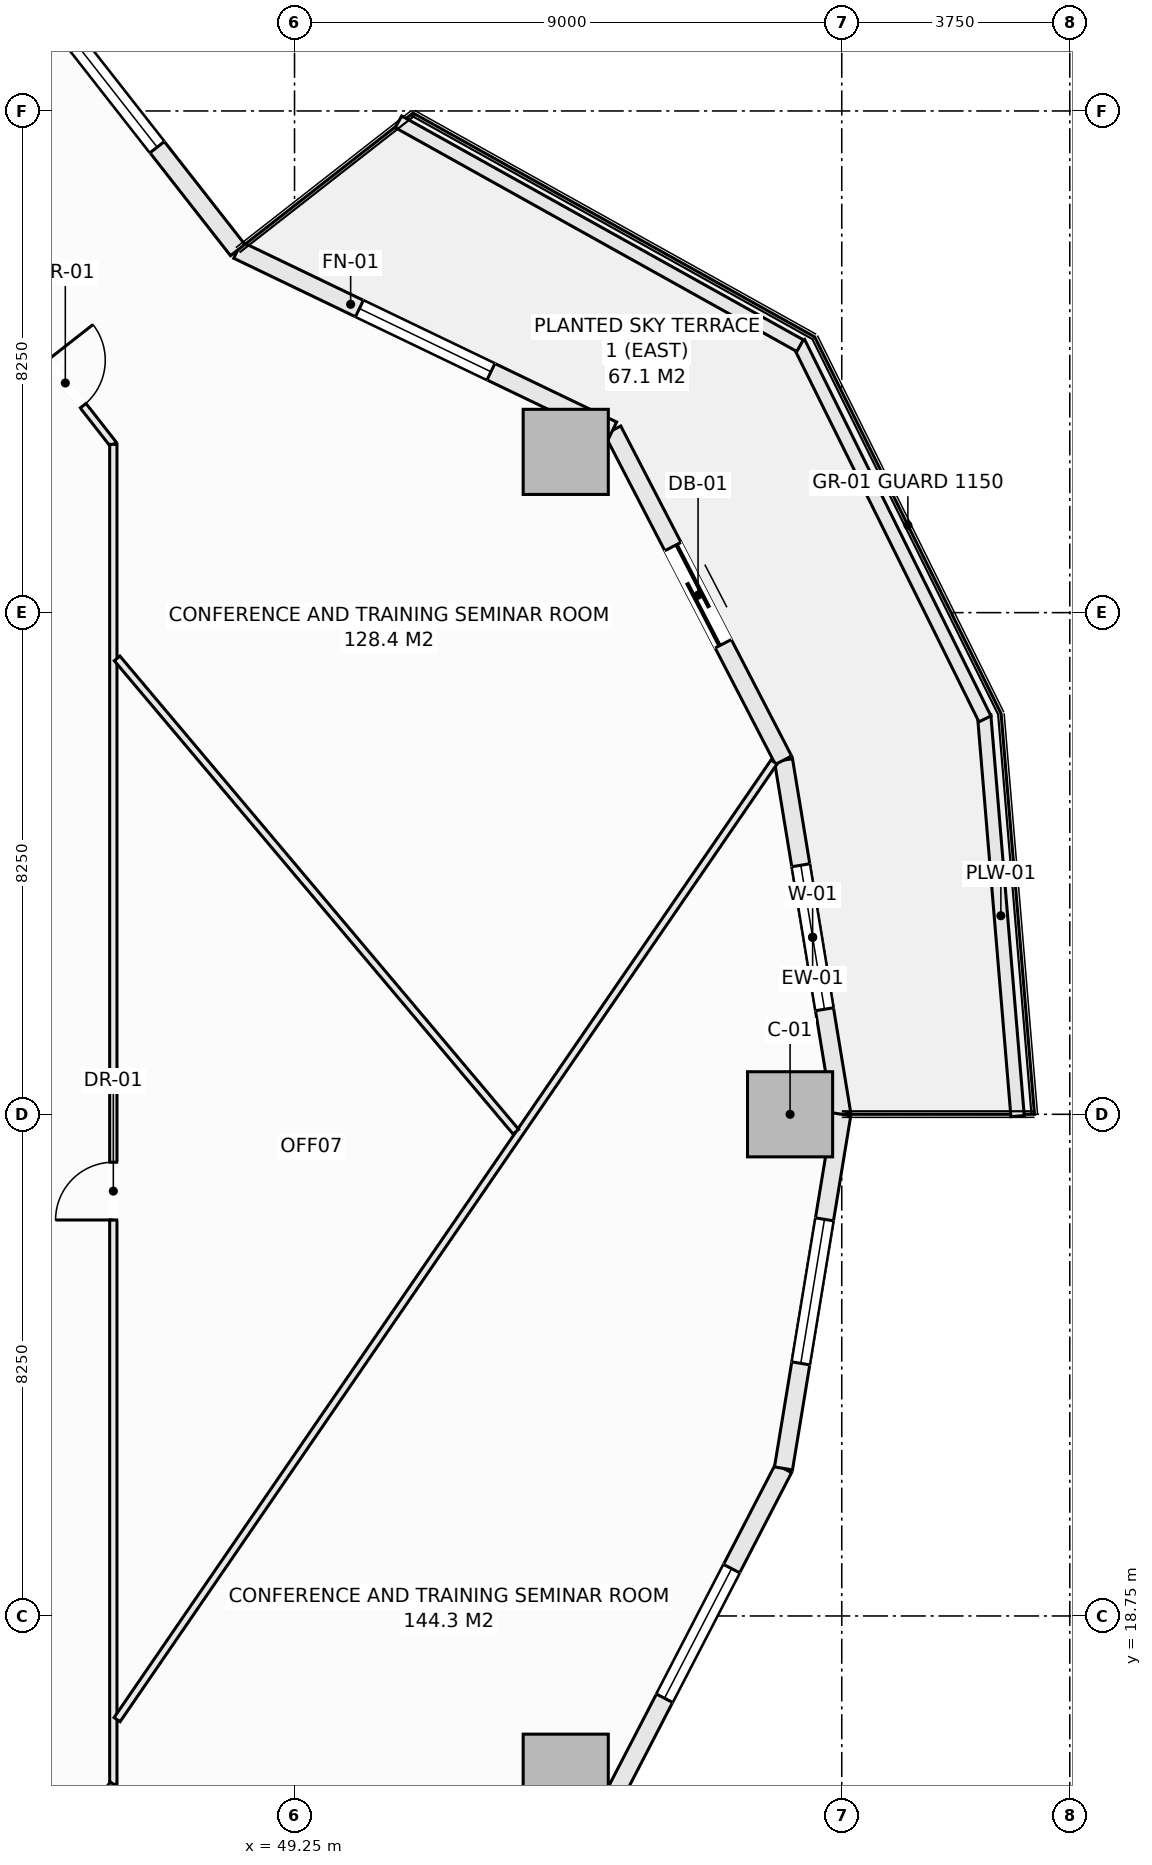
"""IFC4 building model, lengths in metres.
Left out: names, types, materials, properties, quantities, classifications, styles, units other than length and angle.
Written with IfcOpenShell. Run it as: python <this file> out.ifc"""

import sys

from ifc_helpers import new_model, si_unit, direction, frame, frame_2d, origin, origin_2d, place, context, subcontext, project, spatial, rectangle, extrude, element, fill, save


model = new_model("IFC4")
c1 = context("Model", 3, precision=1e-05, world=origin(), true_north=direction((0.0, 1.0)))
c2 = subcontext(c1, "Body", "Model", "MODEL_VIEW")
j1 = project(units=[si_unit("LENGTHUNIT", "METRE"), si_unit("PLANEANGLEUNIT", "RADIAN")], contexts=[c1])
p1 = place(None, origin())
s1 = spatial("IfcSite", under=j1, at=p1, CompositionType="ELEMENT")
p2 = place(p1, origin())
s2 = spatial("IfcBuilding", under=s1, at=p2, CompositionType="ELEMENT")
p3 = place(p2, frame((0.0, 0.0, 34.2)))
s3 = spatial("IfcBuildingStorey", under=s2, at=p3, CompositionType="ELEMENT", Elevation=34.2)
for number, where, z_axis, x_axis in (
    (1, (57.4, 27.0, -0.28), (0.0, 0.0, 1.0), (1.0, 0.0, 0.0)),
    (2, (53.71, 37.894, -0.28), (0.0, 0.0, 1.0), (1.0, 0.0, 0.0)),
    (3, (53.71, 16.106, -0.28), (0.0, 0.0, 1.0), (1.0, 0.0, 0.0)),
):
    element("IfcColumn", number, at=place(p3, frame(where, z_axis=z_axis, x_axis=x_axis)), inside=s3, PredefinedType="COLUMN", context=c2, shape_type="SweptSolid", body=[
        extrude(rectangle(XDim=1.4, YDim=1.4, at=origin_2d()), origin(), (0.0, 0.0, 1.0), 3.85),
    ])
p4 = place(p3, frame((57.292, 32.823, 0.0), z_axis=(0.0, 0.0, 1.0), x_axis=(0.162366057843, -0.98673059305, 0.0)))
e4 = element("IfcWall", 4, at=p4, inside=s3, PredefinedType="SOLIDWALL", context=c2, shape_type="SweptSolid", body=[
    extrude(rectangle(XDim=5.902, YDim=0.3, at=frame_2d((2.951, 0.0))), origin(), (0.0, 0.0, 1.0), 3.093),
])
p5 = place(p4, frame((1.751, 0.0, 0.85)))
e5 = element("IfcOpeningElement", 5, at=p5, cuts=e4, PredefinedType="OPENING", context=c2, shape_type="SweptSolid", body=[
    extrude(rectangle(XDim=2.4, YDim=1.9, at=frame_2d((1.2, 0.95))), frame((0.0, 0.16, 0.0), z_axis=(0.0, -1.0, 0.0), x_axis=(1.0, 0.0, 0.0)), (0.0, 0.0, 1.0), 0.32),
])
p6 = place(p3, frame((54.482, 38.25, 0.0), z_axis=(0.0, 0.0, 1.0), x_axis=(0.459809804413, -0.88801742312, 0.0)))
e6 = element("IfcWall", 6, at=p6, inside=s3, PredefinedType="SOLIDWALL", context=c2, shape_type="SweptSolid", body=[
    extrude(rectangle(XDim=6.111, YDim=0.3, at=frame_2d((3.055, 0.0))), origin(), (0.0, 0.0, 1.0), 3.093),
])
p7 = place(p6, frame((2.155, 0.0, 0.0)))
e7 = element("IfcOpeningElement", 7, at=p7, cuts=e6, PredefinedType="OPENING", context=c2, shape_type="SweptSolid", body=[
    extrude(rectangle(XDim=1.8, YDim=2.25, at=frame_2d((0.9, 1.125))), frame((0.0, 0.16, 0.0), z_axis=(0.0, -1.0, 0.0), x_axis=(1.0, 0.0, 0.0)), (0.0, 0.0, 1.0), 0.32),
])
p8 = place(p3, frame((48.315, 41.213, 0.0), z_axis=(0.0, 0.0, 1.0), x_axis=(0.901360393999, -0.433069786673, 0.0)))
e8 = element("IfcWall", 8, at=p8, inside=s3, PredefinedType="SOLIDWALL", context=c2, shape_type="SweptSolid", body=[
    extrude(rectangle(XDim=6.842, YDim=0.3, at=frame_2d((3.421, 0.0))), origin(), (0.0, 0.0, 1.0), 3.093),
])
p9 = place(p8, frame((2.221, 0.0, 0.85)))
e9 = element("IfcOpeningElement", 9, at=p9, cuts=e8, PredefinedType="OPENING", context=c2, shape_type="SweptSolid", body=[
    extrude(rectangle(XDim=2.4, YDim=1.9, at=frame_2d((1.2, 0.95))), frame((0.0, 0.16, 0.0), z_axis=(0.0, -1.0, 0.0), x_axis=(1.0, 0.0, 0.0)), (0.0, 0.0, 1.0), 0.32),
])
p10 = place(p3, frame((44.188, 46.486, 0.0), z_axis=(0.0, 0.0, 1.0), x_axis=(0.616421309777, -0.787416515482, 0.0)))
e10 = element("IfcWall", 10, at=p10, inside=s3, PredefinedType="SOLIDWALL", context=c2, shape_type="SweptSolid", body=[
    extrude(rectangle(XDim=6.696, YDim=0.3, at=frame_2d((3.348, 0.0))), origin(), (0.0, 0.0, 1.0), 3.093),
])
p11 = place(p10, frame((2.148, 0.0, 0.85)))
e11 = element("IfcOpeningElement", 11, at=p11, cuts=e10, PredefinedType="OPENING", context=c2, shape_type="SweptSolid", body=[
    extrude(rectangle(XDim=2.4, YDim=1.9, at=frame_2d((1.2, 0.95))), frame((0.0, 0.16, 0.0), z_axis=(0.0, -1.0, 0.0), x_axis=(1.0, 0.0, 0.0)), (0.0, 0.0, 1.0), 0.32),
])
p12 = place(p3, frame((54.482, 15.75, 0.0), z_axis=(0.0, 0.0, 1.0), x_axis=(0.459809804413, 0.88801742312, 0.0)))
e12 = element("IfcWall", 12, at=p12, inside=s3, PredefinedType="SOLIDWALL", context=c2, shape_type="SweptSolid", body=[
    extrude(rectangle(XDim=6.111, YDim=0.3, at=frame_2d((3.055, 0.0))), origin(), (0.0, 0.0, 1.0), 3.093),
])
p13 = place(p12, frame((1.855, 0.0, 0.85)))
e13 = element("IfcOpeningElement", 13, at=p13, cuts=e12, PredefinedType="OPENING", context=c2, shape_type="SweptSolid", body=[
    extrude(rectangle(XDim=2.4, YDim=1.9, at=frame_2d((1.2, 0.95))), frame((0.0, 0.16, 0.0), z_axis=(0.0, -1.0, 0.0), x_axis=(1.0, 0.0, 0.0)), (0.0, 0.0, 1.0), 0.32),
])
p14 = place(p3, frame((57.292, 21.177, 0.0), z_axis=(0.0, 0.0, 1.0), x_axis=(0.162366057843, 0.98673059305, 0.0)))
e14 = element("IfcWall", 14, at=p14, inside=s3, PredefinedType="SOLIDWALL", context=c2, shape_type="SweptSolid", body=[
    extrude(rectangle(XDim=5.902, YDim=0.3, at=frame_2d((2.951, 0.0))), origin(), (0.0, 0.0, 1.0), 3.093),
])
p15 = place(p14, frame((1.751, 0.0, 0.85)))
e15 = element("IfcOpeningElement", 15, at=p15, cuts=e14, PredefinedType="OPENING", context=c2, shape_type="SweptSolid", body=[
    extrude(rectangle(XDim=2.4, YDim=1.9, at=frame_2d((1.2, 0.95))), frame((0.0, 0.16, 0.0), z_axis=(0.0, -1.0, 0.0), x_axis=(1.0, 0.0, 0.0)), (0.0, 0.0, 1.0), 0.32),
])
p16 = place(p3, frame((60.592, 33.561, 0.0), z_axis=(0.0, 0.0, 1.0), x_axis=(0.08310047353, -0.996541173911, 0.0)))
e16 = element("IfcWall", 16, at=p16, inside=s3, PredefinedType="PARAPET", context=c2, shape_type="SweptSolid", body=[
    extrude(rectangle(XDim=6.613, YDim=0.22, at=frame_2d((3.307, 0.0))), origin(), (0.0, 0.0, 1.0), 0.52),
])
p17 = place(p3, frame((57.539, 39.697, 0.0), z_axis=(0.0, 0.0, 1.0), x_axis=(0.443578479433, -0.8962355341, 0.0)))
e17 = element("IfcWall", 17, at=p17, inside=s3, PredefinedType="PARAPET", context=c2, shape_type="SweptSolid", body=[
    extrude(rectangle(XDim=6.911, YDim=0.22, at=frame_2d((3.456, 0.0))), origin(), (0.0, 0.0, 1.0), 0.52),
])
p18 = place(p3, frame((50.959, 43.322, 0.0), z_axis=(0.0, 0.0, 1.0), x_axis=(0.873500119739, -0.48682393205, 0.0)))
e18 = element("IfcWall", 18, at=p18, inside=s3, PredefinedType="PARAPET", context=c2, shape_type="SweptSolid", body=[
    extrude(rectangle(XDim=7.562, YDim=0.22, at=frame_2d((3.781, 0.0))), origin(), (0.0, 0.0, 1.0), 0.52),
])
p19 = place(p3, frame((43.137, 42.02, 0.0), z_axis=(0.0, 0.0, 1.0), x_axis=(0.616441660183, -0.787400583941, 0.0)))
e19 = element("IfcWall", 19, at=p19, inside=s3, PredefinedType="PARTITIONING", context=c2, shape_type="SweptSolid", body=[
    extrude(rectangle(XDim=5.083, YDim=0.12, at=frame_2d((2.541, 0.0))), origin(), (0.0, 0.0, 1.0), 3.57),
])
p20 = place(p19, frame((3.326, 0.0, 0.0)))
e20 = element("IfcOpeningElement", 20, at=p20, cuts=e19, PredefinedType="OPENING", context=c2, shape_type="SweptSolid", body=[
    extrude(rectangle(XDim=0.95, YDim=2.1, at=frame_2d((0.475, 1.05))), frame((0.0, 0.07, 0.0), z_axis=(0.0, -1.0, 0.0), x_axis=(1.0, 0.0, 0.0)), (0.0, 0.0, 1.0), 0.14),
])
p21 = place(p3, frame((46.27, 15.982, 0.0), z_axis=(0.0, 0.0, 1.0), x_axis=(0.0, 1.0, 0.0)))
e21 = element("IfcWall", 21, at=p21, inside=s3, PredefinedType="PARTITIONING", context=c2, shape_type="SweptSolid", body=[
    extrude(rectangle(XDim=22.036, YDim=0.12, at=frame_2d((11.018, 0.0))), origin(), (0.0, 0.0, 1.0), 3.57),
])
p22 = place(p21, frame((9.28, 0.0, 0.0)))
e22 = element("IfcOpeningElement", 22, at=p22, cuts=e21, PredefinedType="OPENING", context=c2, shape_type="SweptSolid", body=[
    extrude(rectangle(XDim=0.95, YDim=2.1, at=frame_2d((0.475, 1.05))), frame((0.0, 0.07, 0.0), z_axis=(0.0, -1.0, 0.0), x_axis=(1.0, 0.0, 0.0)), (0.0, 0.0, 1.0), 0.14),
])
p23 = place(p3, frame((42.957, 11.75, 0.0), z_axis=(0.0, 0.0, 1.0), x_axis=(0.616428289415, 0.78741105149, 0.0)))
e23 = element("IfcWall", 23, at=p23, inside=s3, PredefinedType="PARTITIONING", context=c2, shape_type="SweptSolid", body=[
    extrude(rectangle(XDim=5.375, YDim=0.12, at=frame_2d((2.687, 0.0))), origin(), (0.0, 0.0, 1.0), 3.57),
])
p24 = place(p3, frame((46.332, 17.045, 0.0), z_axis=(0.0, 0.0, 1.0), x_axis=(0.565716902062, 0.824599531119, 0.0)))
e24 = element("IfcWall", 24, at=p24, inside=s3, PredefinedType="PARTITIONING", context=c2, shape_type="SweptSolid", body=[
    extrude(rectangle(XDim=19.098, YDim=0.12, at=frame_2d((9.549, 0.0))), origin(), (0.0, 0.0, 1.0), 3.57),
])
p25 = place(p3, frame((46.332, 34.497, 0.0), z_axis=(0.0, 0.0, 1.0), x_axis=(0.644329997074, -0.764747575917, 0.0)))
e25 = element("IfcWall", 25, at=p25, inside=s3, PredefinedType="PARTITIONING", context=c2, shape_type="SweptSolid", body=[
    extrude(rectangle(XDim=10.178, YDim=0.12, at=frame_2d((5.089, 0.0))), origin(), (0.0, 0.0, 1.0), 3.57),
])
p26 = place(p5, origin())
e26 = element("IfcWindow", 26, at=p26, inside=s3, PartitioningType="SINGLE_PANEL", PredefinedType="WINDOW", context=c2, shape_type="SweptSolid", body=[
    extrude(rectangle(XDim=2.4, YDim=1.9, at=frame_2d((1.2, 0.95))), frame((0.0, 0.03, 0.0), z_axis=(0.0, -1.0, 0.0), x_axis=(1.0, 0.0, 0.0)), (0.0, 0.0, 1.0), 0.06),
])
fill(e5, e26)
p27 = place(p7, origin())
e27 = element("IfcDoor", 27, at=p27, inside=s3, OperationType="SLIDING_TO_LEFT", PredefinedType="DOOR", context=c2, shape_type="SweptSolid", body=[
    extrude(rectangle(XDim=1.8, YDim=2.25, at=frame_2d((0.9, 1.125))), frame((0.0, 0.025, 0.0), z_axis=(0.0, -1.0, 0.0), x_axis=(1.0, 0.0, 0.0)), (0.0, 0.0, 1.0), 0.05),
])
fill(e7, e27)
p28 = place(p9, origin())
e28 = element("IfcWindow", 28, at=p28, inside=s3, PartitioningType="SINGLE_PANEL", PredefinedType="WINDOW", context=c2, shape_type="SweptSolid", body=[
    extrude(rectangle(XDim=2.4, YDim=1.9, at=frame_2d((1.2, 0.95))), frame((0.0, 0.03, 0.0), z_axis=(0.0, -1.0, 0.0), x_axis=(1.0, 0.0, 0.0)), (0.0, 0.0, 1.0), 0.06),
])
fill(e9, e28)
p29 = place(p11, origin())
e29 = element("IfcWindow", 29, at=p29, inside=s3, PartitioningType="SINGLE_PANEL", PredefinedType="WINDOW", context=c2, shape_type="SweptSolid", body=[
    extrude(rectangle(XDim=2.4, YDim=1.9, at=frame_2d((1.2, 0.95))), frame((0.0, 0.03, 0.0), z_axis=(0.0, -1.0, 0.0), x_axis=(1.0, 0.0, 0.0)), (0.0, 0.0, 1.0), 0.06),
])
fill(e11, e29)
p30 = place(p13, origin())
e30 = element("IfcWindow", 30, at=p30, inside=s3, PartitioningType="SINGLE_PANEL", PredefinedType="WINDOW", context=c2, shape_type="SweptSolid", body=[
    extrude(rectangle(XDim=2.4, YDim=1.9, at=frame_2d((1.2, 0.95))), frame((0.0, 0.03, 0.0), z_axis=(0.0, -1.0, 0.0), x_axis=(1.0, 0.0, 0.0)), (0.0, 0.0, 1.0), 0.06),
])
fill(e13, e30)
p31 = place(p15, origin())
e31 = element("IfcWindow", 31, at=p31, inside=s3, PartitioningType="SINGLE_PANEL", PredefinedType="WINDOW", context=c2, shape_type="SweptSolid", body=[
    extrude(rectangle(XDim=2.4, YDim=1.9, at=frame_2d((1.2, 0.95))), frame((0.0, 0.03, 0.0), z_axis=(0.0, -1.0, 0.0), x_axis=(1.0, 0.0, 0.0)), (0.0, 0.0, 1.0), 0.06),
])
fill(e15, e31)
p32 = place(p22, origin())
e32 = element("IfcDoor", 32, at=p32, inside=s3, OperationType="SINGLE_SWING_LEFT", PredefinedType="DOOR", context=c2, shape_type="SweptSolid", body=[
    extrude(rectangle(XDim=0.95, YDim=2.1, at=frame_2d((0.475, 1.05))), frame((0.0, 0.025, 0.0), z_axis=(0.0, -1.0, 0.0), x_axis=(1.0, 0.0, 0.0)), (0.0, 0.0, 1.0), 0.05),
])
fill(e22, e32)
p33 = place(p20, origin())
e33 = element("IfcDoor", 33, at=p33, inside=s3, OperationType="SINGLE_SWING_LEFT", PredefinedType="DOOR", context=c2, shape_type="SweptSolid", body=[
    extrude(rectangle(XDim=0.95, YDim=2.1, at=frame_2d((0.475, 1.05))), frame((0.0, 0.025, 0.0), z_axis=(0.0, -1.0, 0.0), x_axis=(1.0, 0.0, 0.0)), (0.0, 0.0, 1.0), 0.05),
])
fill(e20, e33)
save(model, sys.argv[1])
